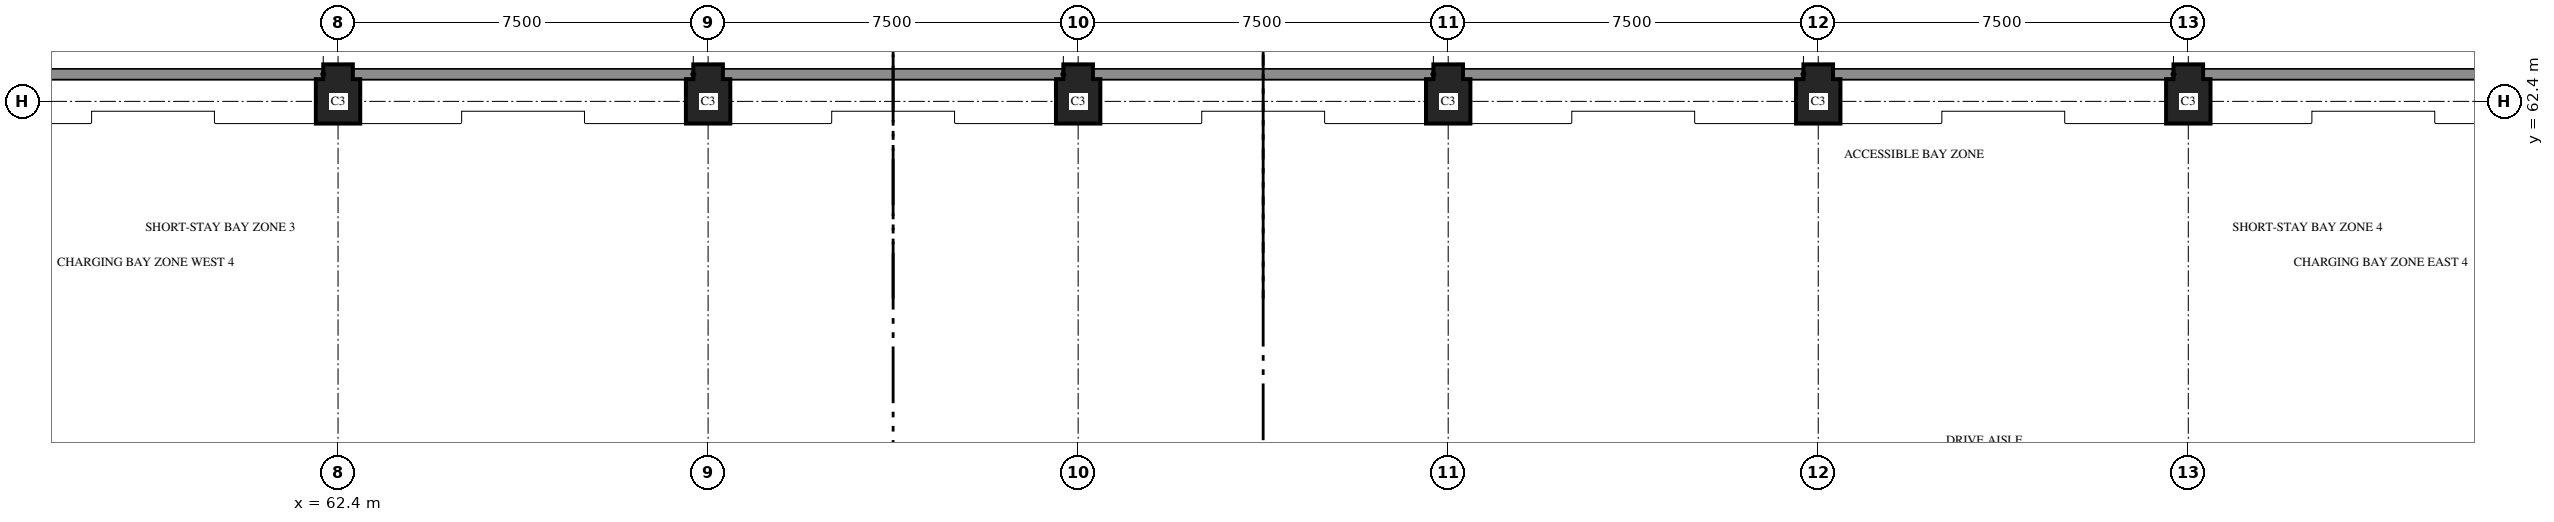
"""IFC4 building model, lengths in metres.
Left out: names, types, materials, properties, quantities, classifications, styles, units other than length and angle.
Written with IfcOpenShell. Run it as: python <this file> out.ifc"""

import sys

from ifc_helpers import new_model, si_unit, direction, frame, origin, place, context, subcontext, project, spatial, polyline, outline, extrude, element, save


model = new_model("IFC4")
c1 = context("Model", 3, precision=1e-05, world=origin(), true_north=direction((0.0, 1.0)))
c2 = subcontext(c1, "Body", "Model", "MODEL_VIEW")
j1 = project(units=[si_unit("LENGTHUNIT", "METRE"), si_unit("PLANEANGLEUNIT", "RADIAN")], contexts=[c1])
p1 = place(None, origin())
s1 = spatial("IfcSite", under=j1, at=p1, CompositionType="ELEMENT")
p2 = place(p1, origin())
s2 = spatial("IfcBuilding", under=s1, at=p2, CompositionType="ELEMENT")
p3 = place(p2, frame((0.0, 0.0, 8.2)))
s3 = spatial("IfcBuildingStorey", under=s2, at=p3, CompositionType="ELEMENT", Elevation=8.2)
for number, where, z_axis, x_axis in (
    (1, (62.4, 62.4, 0.0), (0.0, 0.0, 1.0), (0.0, 1.0, 0.0)),
    (2, (69.9, 62.4, 0.0), (0.0, 0.0, 1.0), (0.0, 1.0, 0.0)),
    (3, (77.4, 62.4, 0.0), (0.0, 0.0, 1.0), (0.0, 1.0, 0.0)),
    (4, (84.9, 62.4, 0.0), (0.0, 0.0, 1.0), (0.0, 1.0, 0.0)),
    (5, (92.4, 62.4, 0.0), (0.0, 0.0, 1.0), (0.0, 1.0, 0.0)),
    (6, (99.9, 62.4, 0.0), (0.0, 0.0, 1.0), (0.0, 1.0, 0.0)),
):
    element("IfcColumn", number, at=place(p3, frame(where, z_axis=z_axis, x_axis=x_axis)), inside=s3, PredefinedType="COLUMN", context=c2, shape_type="SweptSolid", body=[
        extrude(outline(polyline([(-0.45, -0.45), (0.45, -0.45), (0.45, -0.3), (0.75, -0.3), (0.75, 0.3), (0.45, 0.3), (0.45, 0.45), (-0.45, 0.45), (-0.45, -0.45)])), origin(), (0.0, 0.0, 1.0), 3.7),
    ])
save(model, sys.argv[1])
